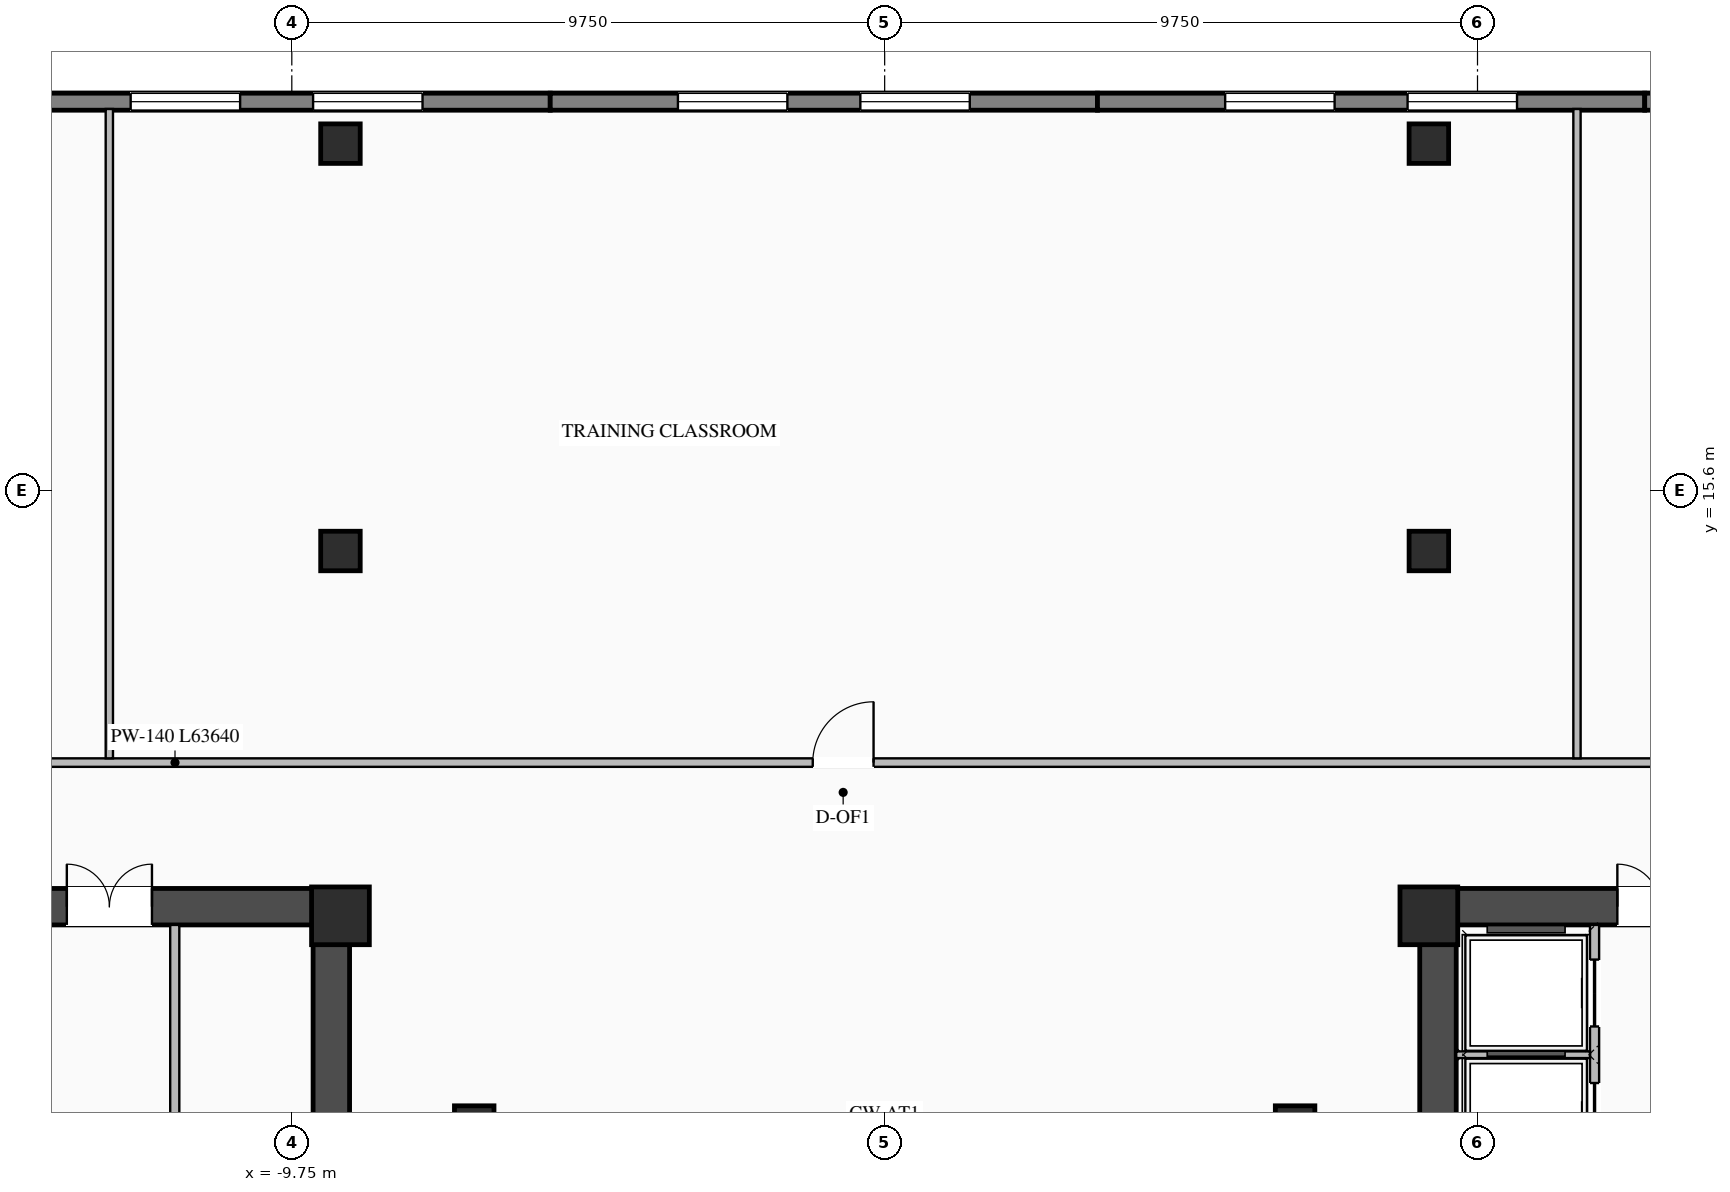
"""IFC4 building model, lengths in metres.
Left out: names, types, materials, properties, quantities, classifications, styles, units other than length and angle.
Written with IfcOpenShell. Run it as: python <this file> out.ifc"""

import sys

from ifc_helpers import new_model, si_unit, direction, frame, frame_2d, origin, origin_2d, place, context, subcontext, project, spatial, rectangle, i_section, extrude, element, fill, save


model = new_model("IFC4")
c1 = context("Model", 3, precision=1e-05, world=origin(), true_north=direction((0.0, 1.0)))
c2 = subcontext(c1, "Body", "Model", "MODEL_VIEW")
j1 = project(units=[si_unit("LENGTHUNIT", "METRE"), si_unit("PLANEANGLEUNIT", "RADIAN")], contexts=[c1])
p1 = place(None, origin())
s1 = spatial("IfcSite", under=j1, at=p1, CompositionType="ELEMENT")
p2 = place(p1, origin())
s2 = spatial("IfcBuilding", under=s1, at=p2, CompositionType="ELEMENT")
p3 = place(p2, frame((0.0, 0.0, 120.85)))
s3 = spatial("IfcBuildingStorey", under=s2, at=p3, CompositionType="ELEMENT", Elevation=120.85)
p4 = place(p3, frame((-19.05, 8.75, 0.0), z_axis=(0.0, 0.0, 1.0), x_axis=(1.0, 0.0, 0.0)))
e1 = element("IfcWall", 1, at=p4, inside=s3, PredefinedType="SHEAR", context=c2, shape_type="SweptSolid", body=[
    extrude(rectangle(XDim=10.25, YDim=0.6, at=frame_2d((5.125, 0.0))), origin(), (0.0, 0.0, 1.0), 3.27),
])
p5 = place(p4, frame((5.6, 0.0, 0.0)))
e2 = element("IfcOpeningElement", 2, at=p5, cuts=e1, PredefinedType="OPENING", context=c2, shape_type="SweptSolid", body=[
    extrude(rectangle(XDim=1.4, YDim=2.05, at=frame_2d((0.7, 1.025))), frame((0.0, 0.31, 0.0), z_axis=(0.0, -1.0, 0.0), x_axis=(1.0, 0.0, 0.0)), (0.0, 0.0, 1.0), 0.62),
])
p6 = place(p3, frame((-9.1, -8.45, 0.0), z_axis=(0.0, 0.0, 1.0), x_axis=(0.0, 1.0, 0.0)))
e3 = element("IfcWall", 3, at=p6, inside=s3, PredefinedType="SHEAR", context=c2, shape_type="SweptSolid", body=[
    extrude(rectangle(XDim=16.9, YDim=0.6, at=frame_2d((8.45, 0.0))), origin(), (0.0, 0.0, 1.0), 3.27),
])
p7 = place(p6, frame((5.2, 0.0, 0.0)))
e4 = element("IfcOpeningElement", 4, at=p7, cuts=e3, PredefinedType="OPENING", context=c2, shape_type="SweptSolid", body=[
    extrude(rectangle(XDim=1.1, YDim=2.08, at=frame_2d((0.55, 1.04))), frame((0.0, 0.31, 0.0), z_axis=(0.0, -1.0, 0.0), x_axis=(1.0, 0.0, 0.0)), (0.0, 0.0, 1.0), 0.62),
])
p8 = place(p3, frame((8.8, 8.75, 0.0), z_axis=(0.0, 0.0, 1.0), x_axis=(1.0, 0.0, 0.0)))
e5 = element("IfcWall", 5, at=p8, inside=s3, PredefinedType="SHEAR", context=c2, shape_type="SweptSolid", body=[
    extrude(rectangle(XDim=10.25, YDim=0.6, at=frame_2d((5.125, 0.0))), origin(), (0.0, 0.0, 1.0), 3.27),
])
p9 = place(p8, frame((3.25, 0.0, 0.0)))
e6 = element("IfcOpeningElement", 6, at=p9, cuts=e5, PredefinedType="OPENING", context=c2, shape_type="SweptSolid", body=[
    extrude(rectangle(XDim=1.4, YDim=2.05, at=frame_2d((0.7, 1.025))), frame((0.0, 0.31, 0.0), z_axis=(0.0, -1.0, 0.0), x_axis=(1.0, 0.0, 0.0)), (0.0, 0.0, 1.0), 0.62),
])
p10 = place(p3, frame((9.1, -8.45, 0.0), z_axis=(0.0, 0.0, 1.0), x_axis=(0.0, 1.0, 0.0)))
e7 = element("IfcWall", 7, at=p10, inside=s3, PredefinedType="SHEAR", context=c2, shape_type="SweptSolid", body=[
    extrude(rectangle(XDim=16.9, YDim=0.6, at=frame_2d((8.45, 0.0))), origin(), (0.0, 0.0, 1.0), 3.27),
])
p11 = place(p10, frame((5.2, 0.0, 0.0)))
e8 = element("IfcOpeningElement", 8, at=p11, cuts=e7, PredefinedType="OPENING", context=c2, shape_type="SweptSolid", body=[
    extrude(rectangle(XDim=1.1, YDim=2.08, at=frame_2d((0.55, 1.04))), frame((0.0, 0.31, 0.0), z_axis=(0.0, -1.0, 0.0), x_axis=(1.0, 0.0, 0.0)), (0.0, 0.0, 1.0), 0.62),
])
for number, where, z_axis, x_axis in (
    (9, (-8.95, 8.6, 0.0), (0.0, 0.0, 1.0), (1.0, 0.0, 0.0)),
    (10, (8.95, 8.6, 0.0), (0.0, 0.0, 1.0), (1.0, 0.0, 0.0)),
):
    element("IfcColumn", number, at=place(p3, frame(where, z_axis=z_axis, x_axis=x_axis)), inside=s3, PredefinedType="COLUMN", context=c2, shape_type="SweptSolid", body=[
        extrude(rectangle(XDim=0.95, YDim=0.95, at=origin_2d()), origin(), (0.0, 0.0, 1.0), 3.45),
    ])
for number, where, z_axis, x_axis in (
    (11, (-6.75, 5.15, 0.0), (0.0, 0.0, 1.0), (1.0, 0.0, 0.0)),
    (12, (6.75, 5.15, 0.0), (0.0, 0.0, 1.0), (1.0, 0.0, 0.0)),
    (13, (-8.95, 14.6, 0.0), (0.0, 0.0, 1.0), (1.0, 0.0, 0.0)),
    (14, (8.95, 14.6, 0.0), (0.0, 0.0, 1.0), (1.0, 0.0, 0.0)),
    (15, (-8.95, 21.3, 0.0), (0.0, 0.0, 1.0), (1.0, 0.0, 0.0)),
    (16, (8.95, 21.3, 0.0), (0.0, 0.0, 1.0), (1.0, 0.0, 0.0)),
):
    element("IfcColumn", number, at=place(p3, frame(where, z_axis=z_axis, x_axis=x_axis)), inside=s3, PredefinedType="COLUMN", context=c2, shape_type="SweptSolid", body=[
        extrude(i_section(OverallWidth=0.65, OverallDepth=0.65, WebThickness=0.028, FlangeThickness=0.04, at=origin_2d()), origin(), (0.0, 0.0, 1.0), 3.45),
    ])
p12 = place(p3, frame((-14.5, 21.99, 0.0), z_axis=(0.0, 0.0, 1.0), x_axis=(1.0, 0.0, 0.0)))
e17 = element("IfcWall", 17, at=p12, inside=s3, PredefinedType="STANDARD", context=c2, shape_type="SweptSolid", body=[
    extrude(rectangle(XDim=9.0, YDim=0.28, at=frame_2d((4.5, 0.0))), origin(), (0.0, 0.0, 1.0), 3.25),
])
p13 = place(p12, frame((2.1, 0.0, 0.76)))
e18 = element("IfcOpeningElement", 18, at=p13, cuts=e17, PredefinedType="OPENING", context=c2, shape_type="SweptSolid", body=[
    extrude(rectangle(XDim=1.8, YDim=1.95, at=frame_2d((0.9, 0.975))), frame((0.0, 0.15, 0.0), z_axis=(0.0, -1.0, 0.0), x_axis=(1.0, 0.0, 0.0)), (0.0, 0.0, 1.0), 0.3),
])
p14 = place(p12, frame((5.1, 0.0, 0.76)))
e19 = element("IfcOpeningElement", 19, at=p14, cuts=e17, PredefinedType="OPENING", context=c2, shape_type="SweptSolid", body=[
    extrude(rectangle(XDim=1.8, YDim=1.95, at=frame_2d((0.9, 0.975))), frame((0.0, 0.15, 0.0), z_axis=(0.0, -1.0, 0.0), x_axis=(1.0, 0.0, 0.0)), (0.0, 0.0, 1.0), 0.3),
])
p15 = place(p3, frame((-5.5, 21.99, 0.0), z_axis=(0.0, 0.0, 1.0), x_axis=(1.0, 0.0, 0.0)))
e20 = element("IfcWall", 20, at=p15, inside=s3, PredefinedType="STANDARD", context=c2, shape_type="SweptSolid", body=[
    extrude(rectangle(XDim=9.0, YDim=0.28, at=frame_2d((4.5, 0.0))), origin(), (0.0, 0.0, 1.0), 3.25),
])
p16 = place(p15, frame((2.1, 0.0, 0.76)))
e21 = element("IfcOpeningElement", 21, at=p16, cuts=e20, PredefinedType="OPENING", context=c2, shape_type="SweptSolid", body=[
    extrude(rectangle(XDim=1.8, YDim=1.95, at=frame_2d((0.9, 0.975))), frame((0.0, 0.15, 0.0), z_axis=(0.0, -1.0, 0.0), x_axis=(1.0, 0.0, 0.0)), (0.0, 0.0, 1.0), 0.3),
])
p17 = place(p15, frame((5.1, 0.0, 0.76)))
e22 = element("IfcOpeningElement", 22, at=p17, cuts=e20, PredefinedType="OPENING", context=c2, shape_type="SweptSolid", body=[
    extrude(rectangle(XDim=1.8, YDim=1.95, at=frame_2d((0.9, 0.975))), frame((0.0, 0.15, 0.0), z_axis=(0.0, -1.0, 0.0), x_axis=(1.0, 0.0, 0.0)), (0.0, 0.0, 1.0), 0.3),
])
p18 = place(p3, frame((3.5, 21.99, 0.0), z_axis=(0.0, 0.0, 1.0), x_axis=(1.0, 0.0, 0.0)))
e23 = element("IfcWall", 23, at=p18, inside=s3, PredefinedType="STANDARD", context=c2, shape_type="SweptSolid", body=[
    extrude(rectangle(XDim=9.0, YDim=0.28, at=frame_2d((4.5, 0.0))), origin(), (0.0, 0.0, 1.0), 3.25),
])
p19 = place(p18, frame((2.1, 0.0, 0.76)))
e24 = element("IfcOpeningElement", 24, at=p19, cuts=e23, PredefinedType="OPENING", context=c2, shape_type="SweptSolid", body=[
    extrude(rectangle(XDim=1.8, YDim=1.95, at=frame_2d((0.9, 0.975))), frame((0.0, 0.15, 0.0), z_axis=(0.0, -1.0, 0.0), x_axis=(1.0, 0.0, 0.0)), (0.0, 0.0, 1.0), 0.3),
])
p20 = place(p18, frame((5.1, 0.0, 0.76)))
e25 = element("IfcOpeningElement", 25, at=p20, cuts=e23, PredefinedType="OPENING", context=c2, shape_type="SweptSolid", body=[
    extrude(rectangle(XDim=1.8, YDim=1.95, at=frame_2d((0.9, 0.975))), frame((0.0, 0.15, 0.0), z_axis=(0.0, -1.0, 0.0), x_axis=(1.0, 0.0, 0.0)), (0.0, 0.0, 1.0), 0.3),
])
p21 = place(p3, frame((12.5, 21.99, 0.0), z_axis=(0.0, 0.0, 1.0), x_axis=(1.0, 0.0, 0.0)))
e26 = element("IfcWall", 26, at=p21, inside=s3, PredefinedType="STANDARD", context=c2, shape_type="SweptSolid", body=[
    extrude(rectangle(XDim=16.04, YDim=0.28, at=frame_2d((8.02, 0.0))), origin(), (0.0, 0.0, 1.0), 3.25),
])
p22 = place(p21, frame((4.447, 0.0, 0.76)))
e27 = element("IfcOpeningElement", 27, at=p22, cuts=e26, PredefinedType="OPENING", context=c2, shape_type="SweptSolid", body=[
    extrude(rectangle(XDim=1.8, YDim=1.95, at=frame_2d((0.9, 0.975))), frame((0.0, 0.15, 0.0), z_axis=(0.0, -1.0, 0.0), x_axis=(1.0, 0.0, 0.0)), (0.0, 0.0, 1.0), 0.3),
])
p23 = place(p21, frame((9.793, 0.0, 0.76)))
e28 = element("IfcOpeningElement", 28, at=p23, cuts=e26, PredefinedType="OPENING", context=c2, shape_type="SweptSolid", body=[
    extrude(rectangle(XDim=1.8, YDim=1.95, at=frame_2d((0.9, 0.975))), frame((0.0, 0.15, 0.0), z_axis=(0.0, -1.0, 0.0), x_axis=(1.0, 0.0, 0.0)), (0.0, 0.0, 1.0), 0.3),
])
p24 = place(p3, frame((-11.675, 0.27, 0.0), z_axis=(0.0, 0.0, 1.0), x_axis=(0.0, 1.0, 0.0)))
e29 = element("IfcWall", 29, at=p24, inside=s3, PredefinedType="STANDARD", context=c2, shape_type="SweptSolid", body=[
    extrude(rectangle(XDim=8.18, YDim=0.15, at=frame_2d((4.09, 0.0))), origin(), (0.0, 0.0, 1.0), 3.25),
])
p25 = place(p24, frame((2.85, 0.0, 0.0)))
e30 = element("IfcOpeningElement", 30, at=p25, cuts=e29, PredefinedType="OPENING", context=c2, shape_type="SweptSolid", body=[
    extrude(rectangle(XDim=0.95, YDim=2.05, at=frame_2d((0.475, 1.025))), frame((0.0, 0.085, 0.0), z_axis=(0.0, -1.0, 0.0), x_axis=(1.0, 0.0, 0.0)), (0.0, 0.0, 1.0), 0.17),
])
p26 = place(p3, frame((11.675, 0.27, 0.0), z_axis=(0.0, 0.0, 1.0), x_axis=(0.0, 1.0, 0.0)))
e31 = element("IfcWall", 31, at=p26, inside=s3, PredefinedType="STANDARD", context=c2, shape_type="SweptSolid", body=[
    extrude(rectangle(XDim=8.18, YDim=0.15, at=frame_2d((4.09, 0.0))), origin(), (0.0, 0.0, 1.0), 3.25),
])
p27 = place(p26, frame((0.42, 0.0, 0.0)))
e32 = element("IfcOpeningElement", 32, at=p27, cuts=e31, PredefinedType="OPENING", context=c2, shape_type="SweptSolid", body=[
    extrude(rectangle(XDim=1.1, YDim=2.1, at=frame_2d((0.55, 1.05))), frame((0.0, 0.085, 0.0), z_axis=(0.0, -1.0, 0.0), x_axis=(1.0, 0.0, 0.0)), (0.0, 0.0, 1.0), 0.17),
])
p28 = place(p26, frame((2.45, 0.0, 0.0)))
e33 = element("IfcOpeningElement", 33, at=p28, cuts=e31, PredefinedType="OPENING", context=c2, shape_type="SweptSolid", body=[
    extrude(rectangle(XDim=1.1, YDim=2.1, at=frame_2d((0.55, 1.05))), frame((0.0, 0.085, 0.0), z_axis=(0.0, -1.0, 0.0), x_axis=(1.0, 0.0, 0.0)), (0.0, 0.0, 1.0), 0.17),
])
p29 = place(p26, frame((4.48, 0.0, 0.0)))
e34 = element("IfcOpeningElement", 34, at=p29, cuts=e31, PredefinedType="OPENING", context=c2, shape_type="SweptSolid", body=[
    extrude(rectangle(XDim=1.1, YDim=2.1, at=frame_2d((0.55, 1.05))), frame((0.0, 0.085, 0.0), z_axis=(0.0, -1.0, 0.0), x_axis=(1.0, 0.0, 0.0)), (0.0, 0.0, 1.0), 0.17),
])
p30 = place(p26, frame((6.51, 0.0, 0.0)))
e35 = element("IfcOpeningElement", 35, at=p30, cuts=e31, PredefinedType="OPENING", context=c2, shape_type="SweptSolid", body=[
    extrude(rectangle(XDim=1.1, YDim=2.1, at=frame_2d((0.55, 1.05))), frame((0.0, 0.085, 0.0), z_axis=(0.0, -1.0, 0.0), x_axis=(1.0, 0.0, 0.0)), (0.0, 0.0, 1.0), 0.17),
])
p31 = place(p3, frame((9.4, 6.315, 0.0), z_axis=(0.0, 0.0, 1.0), x_axis=(1.0, 0.0, 0.0)))
e36 = element("IfcWall", 36, at=p31, inside=s3, PredefinedType="STANDARD", context=c2, shape_type="SweptSolid", body=[
    extrude(rectangle(XDim=2.2, YDim=0.11, at=frame_2d((1.1, 0.0))), origin(), (0.0, 0.0, 1.0), 3.25),
])
p32 = place(p3, frame((-32.82, 11.12, 0.0), z_axis=(0.0, 0.0, 1.0), x_axis=(1.0, 0.0, 0.0)))
e37 = element("IfcWall", 37, at=p32, inside=s3, PredefinedType="STANDARD", context=c2, shape_type="SweptSolid", body=[
    extrude(rectangle(XDim=63.64, YDim=0.14, at=frame_2d((31.82, 0.0))), origin(), (0.0, 0.0, 1.0), 3.25),
])
p33 = place(p32, frame((9.66, 0.0, 0.0)))
e38 = element("IfcOpeningElement", 38, at=p33, cuts=e37, PredefinedType="OPENING", context=c2, shape_type="SweptSolid", body=[
    extrude(rectangle(XDim=1.0, YDim=2.08, at=frame_2d((0.5, 1.04))), frame((0.0, 0.08, 0.0), z_axis=(0.0, -1.0, 0.0), x_axis=(1.0, 0.0, 0.0)), (0.0, 0.0, 1.0), 0.16),
])
p34 = place(p32, frame((31.637, 0.0, 0.0)))
e39 = element("IfcOpeningElement", 39, at=p34, cuts=e37, PredefinedType="OPENING", context=c2, shape_type="SweptSolid", body=[
    extrude(rectangle(XDim=1.0, YDim=2.08, at=frame_2d((0.5, 1.04))), frame((0.0, 0.08, 0.0), z_axis=(0.0, -1.0, 0.0), x_axis=(1.0, 0.0, 0.0)), (0.0, 0.0, 1.0), 0.16),
])
p35 = place(p32, frame((53.297, 0.0, 0.0)))
e40 = element("IfcOpeningElement", 40, at=p35, cuts=e37, PredefinedType="OPENING", context=c2, shape_type="SweptSolid", body=[
    extrude(rectangle(XDim=1.0, YDim=2.08, at=frame_2d((0.5, 1.04))), frame((0.0, 0.08, 0.0), z_axis=(0.0, -1.0, 0.0), x_axis=(1.0, 0.0, 0.0)), (0.0, 0.0, 1.0), 0.16),
])
for number, where, z_axis, x_axis in (
    (41, (-12.751, 11.19, 0.0), (0.0, 0.0, 1.0), (0.0, 1.0, 0.0)),
    (42, (11.386, 11.19, 0.0), (0.0, 0.0, 1.0), (0.0, 1.0, 0.0)),
):
    element("IfcWall", number, at=place(p3, frame(where, z_axis=z_axis, x_axis=x_axis)), inside=s3, PredefinedType="STANDARD", context=c2, shape_type="SweptSolid", body=[
        extrude(rectangle(XDim=10.68, YDim=0.12, at=frame_2d((5.34, 0.0))), origin(), (0.0, 0.0, 1.0), 3.25),
    ])
p36 = place(p13, origin())
e43 = element("IfcWindow", 43, at=p36, inside=s3, PartitioningType="SINGLE_PANEL", PredefinedType="WINDOW", context=c2, shape_type="SweptSolid", body=[
    extrude(rectangle(XDim=1.8, YDim=1.95, at=frame_2d((0.9, 0.975))), frame((0.0, 0.03, 0.0), z_axis=(0.0, -1.0, 0.0), x_axis=(1.0, 0.0, 0.0)), (0.0, 0.0, 1.0), 0.06),
])
fill(e18, e43)
p37 = place(p14, origin())
e44 = element("IfcWindow", 44, at=p37, inside=s3, PartitioningType="SINGLE_PANEL", PredefinedType="WINDOW", context=c2, shape_type="SweptSolid", body=[
    extrude(rectangle(XDim=1.8, YDim=1.95, at=frame_2d((0.9, 0.975))), frame((0.0, 0.03, 0.0), z_axis=(0.0, -1.0, 0.0), x_axis=(1.0, 0.0, 0.0)), (0.0, 0.0, 1.0), 0.06),
])
fill(e19, e44)
p38 = place(p16, origin())
e45 = element("IfcWindow", 45, at=p38, inside=s3, PartitioningType="SINGLE_PANEL", PredefinedType="WINDOW", context=c2, shape_type="SweptSolid", body=[
    extrude(rectangle(XDim=1.8, YDim=1.95, at=frame_2d((0.9, 0.975))), frame((0.0, 0.03, 0.0), z_axis=(0.0, -1.0, 0.0), x_axis=(1.0, 0.0, 0.0)), (0.0, 0.0, 1.0), 0.06),
])
fill(e21, e45)
p39 = place(p17, origin())
e46 = element("IfcWindow", 46, at=p39, inside=s3, PartitioningType="SINGLE_PANEL", PredefinedType="WINDOW", context=c2, shape_type="SweptSolid", body=[
    extrude(rectangle(XDim=1.8, YDim=1.95, at=frame_2d((0.9, 0.975))), frame((0.0, 0.03, 0.0), z_axis=(0.0, -1.0, 0.0), x_axis=(1.0, 0.0, 0.0)), (0.0, 0.0, 1.0), 0.06),
])
fill(e22, e46)
p40 = place(p19, origin())
e47 = element("IfcWindow", 47, at=p40, inside=s3, PartitioningType="SINGLE_PANEL", PredefinedType="WINDOW", context=c2, shape_type="SweptSolid", body=[
    extrude(rectangle(XDim=1.8, YDim=1.95, at=frame_2d((0.9, 0.975))), frame((0.0, 0.03, 0.0), z_axis=(0.0, -1.0, 0.0), x_axis=(1.0, 0.0, 0.0)), (0.0, 0.0, 1.0), 0.06),
])
fill(e24, e47)
p41 = place(p20, origin())
e48 = element("IfcWindow", 48, at=p41, inside=s3, PartitioningType="SINGLE_PANEL", PredefinedType="WINDOW", context=c2, shape_type="SweptSolid", body=[
    extrude(rectangle(XDim=1.8, YDim=1.95, at=frame_2d((0.9, 0.975))), frame((0.0, 0.03, 0.0), z_axis=(0.0, -1.0, 0.0), x_axis=(1.0, 0.0, 0.0)), (0.0, 0.0, 1.0), 0.06),
])
fill(e25, e48)
p42 = place(p5, origin())
e49 = element("IfcDoor", 49, at=p42, inside=s3, OperationType="DOUBLE_DOOR_SINGLE_SWING", PredefinedType="DOOR", context=c2, shape_type="SweptSolid", body=[
    extrude(rectangle(XDim=1.4, YDim=2.05, at=frame_2d((0.7, 1.025))), frame((0.0, 0.245, 0.0), z_axis=(0.0, -1.0, 0.0), x_axis=(1.0, 0.0, 0.0)), (0.0, 0.0, 1.0), 0.05),
])
fill(e2, e49)
p43 = place(p9, origin())
e50 = element("IfcDoor", 50, at=p43, inside=s3, OperationType="DOUBLE_DOOR_SINGLE_SWING", PredefinedType="DOOR", context=c2, shape_type="SweptSolid", body=[
    extrude(rectangle(XDim=1.4, YDim=2.05, at=frame_2d((0.7, 1.025))), frame((0.0, 0.245, 0.0), z_axis=(0.0, -1.0, 0.0), x_axis=(1.0, 0.0, 0.0)), (0.0, 0.0, 1.0), 0.05),
])
fill(e6, e50)
p44 = place(p29, origin())
e51 = element("IfcDoor", 51, at=p44, inside=s3, OperationType="DOUBLE_DOOR_SLIDING", PredefinedType="DOOR", context=c2, shape_type="SweptSolid", body=[
    extrude(rectangle(XDim=1.1, YDim=2.1, at=frame_2d((0.55, 1.05))), frame((0.0, 0.025, 0.0), z_axis=(0.0, -1.0, 0.0), x_axis=(1.0, 0.0, 0.0)), (0.0, 0.0, 1.0), 0.05),
])
fill(e34, e51)
p45 = place(p30, origin())
e52 = element("IfcDoor", 52, at=p45, inside=s3, OperationType="DOUBLE_DOOR_SLIDING", PredefinedType="DOOR", context=c2, shape_type="SweptSolid", body=[
    extrude(rectangle(XDim=1.1, YDim=2.1, at=frame_2d((0.55, 1.05))), frame((0.0, 0.025, 0.0), z_axis=(0.0, -1.0, 0.0), x_axis=(1.0, 0.0, 0.0)), (0.0, 0.0, 1.0), 0.05),
])
fill(e35, e52)
p46 = place(p34, origin())
e53 = element("IfcDoor", 53, at=p46, inside=s3, OperationType="SINGLE_SWING_RIGHT", PredefinedType="DOOR", context=c2, shape_type="SweptSolid", body=[
    extrude(rectangle(XDim=1.0, YDim=2.08, at=frame_2d((0.5, 1.04))), frame((0.0, 0.025, 0.0), z_axis=(0.0, -1.0, 0.0), x_axis=(1.0, 0.0, 0.0)), (0.0, 0.0, 1.0), 0.05),
])
fill(e39, e53)
save(model, sys.argv[1])
